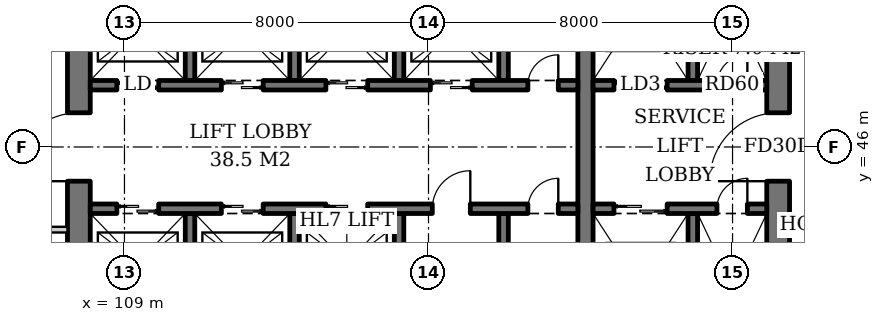
"""IFC4 building model, lengths in metres.
Left out: names, types, materials, properties, quantities, classifications, styles, units other than length and angle.
Written with IfcOpenShell. Run it as: python <this file> out.ifc"""

import sys

from ifc_helpers import new_model, si_unit, direction, frame, frame_2d, origin, place, context, subcontext, project, spatial, rectangle, extrude, element, fill, save


model = new_model("IFC4")
c1 = context("Model", 3, precision=1e-05, world=origin(), true_north=direction((0.0, 1.0)))
c2 = subcontext(c1, "Body", "Model", "MODEL_VIEW")
j1 = project(units=[si_unit("LENGTHUNIT", "METRE"), si_unit("PLANEANGLEUNIT", "RADIAN")], contexts=[c1])
p1 = place(None, origin())
s1 = spatial("IfcSite", under=j1, at=p1, CompositionType="ELEMENT")
p2 = place(p1, origin())
s2 = spatial("IfcBuilding", under=s1, at=p2, CompositionType="ELEMENT")
p3 = place(p2, origin())
s3 = spatial("IfcBuildingStorey", under=s2, at=p3, CompositionType="ELEMENT", Elevation=0.0)
p4 = place(p3, frame((107.8, 37.1, 0.0), z_axis=(0.0, 0.0, 1.0), x_axis=(0.0, 1.0, 0.0)))
e1 = element("IfcWall", 1, at=p4, inside=s3, PredefinedType="SHEAR", context=c2, shape_type="SweptSolid", body=[
    extrude(rectangle(XDim=17.8, YDim=0.6, at=frame_2d((8.9, 0.0))), origin(), (0.0, 0.0, 1.0), 6.0),
])
p5 = place(p4, frame((8.0, 0.0, 0.0)))
e2 = element("IfcOpeningElement", 2, at=p5, cuts=e1, PredefinedType="OPENING", context=c2, shape_type="SweptSolid", body=[
    extrude(rectangle(XDim=1.8, YDim=2.4, at=frame_2d((0.9, 1.2))), frame((0.0, 0.31, 0.0), z_axis=(0.0, -1.0, 0.0), x_axis=(1.0, 0.0, 0.0)), (0.0, 0.0, 1.0), 0.62),
])
p6 = place(p3, frame((126.2, 37.1, 0.0), z_axis=(0.0, 0.0, 1.0), x_axis=(0.0, 1.0, 0.0)))
e3 = element("IfcWall", 3, at=p6, inside=s3, PredefinedType="SHEAR", context=c2, shape_type="SweptSolid", body=[
    extrude(rectangle(XDim=17.8, YDim=0.6, at=frame_2d((8.9, 0.0))), origin(), (0.0, 0.0, 1.0), 6.0),
])
p7 = place(p6, frame((8.0, 0.0, 0.0)))
e4 = element("IfcOpeningElement", 4, at=p7, cuts=e3, PredefinedType="OPENING", context=c2, shape_type="SweptSolid", body=[
    extrude(rectangle(XDim=1.8, YDim=2.4, at=frame_2d((0.9, 1.2))), frame((0.0, 0.31, 0.0), z_axis=(0.0, -1.0, 0.0), x_axis=(1.0, 0.0, 0.0)), (0.0, 0.0, 1.0), 0.62),
])
p8 = place(p3, frame((121.13, 40.4, 0.0), z_axis=(0.0, 0.0, 1.0), x_axis=(0.0, 1.0, 0.0)))
e5 = element("IfcWall", 5, at=p8, inside=s3, PredefinedType="SHEAR", context=c2, shape_type="SweptSolid", body=[
    extrude(rectangle(XDim=11.2, YDim=0.4, at=frame_2d((5.6, 0.0))), origin(), (0.0, 0.0, 1.0), 6.0),
])
for number, where, z_axis, x_axis in (
    (6, (110.725, 47.75, 0.0), (0.0, 0.0, 1.0), (0.0, 1.0, 0.0)),
    (7, (113.475, 47.75, 0.0), (0.0, 0.0, 1.0), (0.0, 1.0, 0.0)),
    (8, (116.225, 47.75, 0.0), (0.0, 0.0, 1.0), (0.0, 1.0, 0.0)),
    (9, (118.975, 47.75, 0.0), (0.0, 0.0, 1.0), (0.0, 1.0, 0.0)),
):
    element("IfcWall", number, at=place(p3, frame(where, z_axis=z_axis, x_axis=x_axis)), inside=s3, PredefinedType="SHEAR", context=c2, shape_type="SweptSolid", body=[
        extrude(rectangle(XDim=2.6, YDim=0.25, at=frame_2d((1.3, 0.0))), origin(), (0.0, 0.0, 1.0), 6.0),
    ])
p9 = place(p3, frame((108.1, 47.625, 0.0), z_axis=(0.0, 0.0, 1.0), x_axis=(1.0, 0.0, 0.0)))
e10 = element("IfcWall", 10, at=p9, inside=s3, PredefinedType="SHEAR", context=c2, shape_type="SweptSolid", body=[
    extrude(rectangle(XDim=12.83, YDim=0.25, at=frame_2d((6.415, 0.0))), origin(), (0.0, 0.0, 1.0), 6.0),
])
p10 = place(p9, frame((0.7, 0.0, 0.0)))
e11 = element("IfcOpeningElement", 11, at=p10, cuts=e10, PredefinedType="OPENING", context=c2, shape_type="SweptSolid", body=[
    extrude(rectangle(XDim=1.1, YDim=2.2, at=frame_2d((0.55, 1.1))), frame((0.0, 0.135, 0.0), z_axis=(0.0, -1.0, 0.0), x_axis=(1.0, 0.0, 0.0)), (0.0, 0.0, 1.0), 0.27),
])
p11 = place(p9, frame((3.45, 0.0, 0.0)))
e12 = element("IfcOpeningElement", 12, at=p11, cuts=e10, PredefinedType="OPENING", context=c2, shape_type="SweptSolid", body=[
    extrude(rectangle(XDim=1.1, YDim=2.2, at=frame_2d((0.55, 1.1))), frame((0.0, 0.135, 0.0), z_axis=(0.0, -1.0, 0.0), x_axis=(1.0, 0.0, 0.0)), (0.0, 0.0, 1.0), 0.27),
])
p12 = place(p9, frame((6.2, 0.0, 0.0)))
e13 = element("IfcOpeningElement", 13, at=p12, cuts=e10, PredefinedType="OPENING", context=c2, shape_type="SweptSolid", body=[
    extrude(rectangle(XDim=1.1, YDim=2.2, at=frame_2d((0.55, 1.1))), frame((0.0, 0.135, 0.0), z_axis=(0.0, -1.0, 0.0), x_axis=(1.0, 0.0, 0.0)), (0.0, 0.0, 1.0), 0.27),
])
p13 = place(p9, frame((8.95, 0.0, 0.0)))
e14 = element("IfcOpeningElement", 14, at=p13, cuts=e10, PredefinedType="OPENING", context=c2, shape_type="SweptSolid", body=[
    extrude(rectangle(XDim=1.1, YDim=2.2, at=frame_2d((0.55, 1.1))), frame((0.0, 0.135, 0.0), z_axis=(0.0, -1.0, 0.0), x_axis=(1.0, 0.0, 0.0)), (0.0, 0.0, 1.0), 0.27),
])
p14 = place(p9, frame((11.515, 0.0, 0.0)))
e15 = element("IfcOpeningElement", 15, at=p14, cuts=e10, PredefinedType="OPENING", context=c2, shape_type="SweptSolid", body=[
    extrude(rectangle(XDim=0.8, YDim=2.0, at=frame_2d((0.4, 1.0))), frame((0.0, 0.135, 0.0), z_axis=(0.0, -1.0, 0.0), x_axis=(1.0, 0.0, 0.0)), (0.0, 0.0, 1.0), 0.27),
])
for number, where, z_axis, x_axis in (
    (16, (110.725, 44.25, 0.0), (0.0, 0.0, 1.0), (0.0, -1.0, 0.0)),
    (17, (113.475, 44.25, 0.0), (0.0, 0.0, 1.0), (0.0, -1.0, 0.0)),
    (18, (116.225, 44.25, 0.0), (0.0, 0.0, 1.0), (0.0, -1.0, 0.0)),
    (19, (118.975, 44.25, 0.0), (0.0, 0.0, 1.0), (0.0, -1.0, 0.0)),
):
    element("IfcWall", number, at=place(p3, frame(where, z_axis=z_axis, x_axis=x_axis)), inside=s3, PredefinedType="SHEAR", context=c2, shape_type="SweptSolid", body=[
        extrude(rectangle(XDim=2.6, YDim=0.25, at=frame_2d((1.3, 0.0))), origin(), (0.0, 0.0, 1.0), 6.0),
    ])
p15 = place(p3, frame((108.1, 44.375, 0.0), z_axis=(0.0, 0.0, 1.0), x_axis=(1.0, 0.0, 0.0)))
e20 = element("IfcWall", 20, at=p15, inside=s3, PredefinedType="SHEAR", context=c2, shape_type="SweptSolid", body=[
    extrude(rectangle(XDim=12.83, YDim=0.25, at=frame_2d((6.415, 0.0))), origin(), (0.0, 0.0, 1.0), 6.0),
])
p16 = place(p15, frame((0.7, 0.0, 0.0)))
e21 = element("IfcOpeningElement", 21, at=p16, cuts=e20, PredefinedType="OPENING", context=c2, shape_type="SweptSolid", body=[
    extrude(rectangle(XDim=1.1, YDim=2.2, at=frame_2d((0.55, 1.1))), frame((0.0, 0.135, 0.0), z_axis=(0.0, -1.0, 0.0), x_axis=(1.0, 0.0, 0.0)), (0.0, 0.0, 1.0), 0.27),
])
p17 = place(p15, frame((3.45, 0.0, 0.0)))
e22 = element("IfcOpeningElement", 22, at=p17, cuts=e20, PredefinedType="OPENING", context=c2, shape_type="SweptSolid", body=[
    extrude(rectangle(XDim=1.1, YDim=2.2, at=frame_2d((0.55, 1.1))), frame((0.0, 0.135, 0.0), z_axis=(0.0, -1.0, 0.0), x_axis=(1.0, 0.0, 0.0)), (0.0, 0.0, 1.0), 0.27),
])
p18 = place(p15, frame((6.2, 0.0, 0.0)))
e23 = element("IfcOpeningElement", 23, at=p18, cuts=e20, PredefinedType="OPENING", context=c2, shape_type="SweptSolid", body=[
    extrude(rectangle(XDim=1.1, YDim=2.2, at=frame_2d((0.55, 1.1))), frame((0.0, 0.135, 0.0), z_axis=(0.0, -1.0, 0.0), x_axis=(1.0, 0.0, 0.0)), (0.0, 0.0, 1.0), 0.27),
])
p19 = place(p15, frame((9.0, 0.0, 0.0)))
e24 = element("IfcOpeningElement", 24, at=p19, cuts=e20, PredefinedType="OPENING", context=c2, shape_type="SweptSolid", body=[
    extrude(rectangle(XDim=1.0, YDim=2.1, at=frame_2d((0.5, 1.05))), frame((0.0, 0.135, 0.0), z_axis=(0.0, -1.0, 0.0), x_axis=(1.0, 0.0, 0.0)), (0.0, 0.0, 1.0), 0.27),
])
p20 = place(p15, frame((11.515, 0.0, 0.0)))
e25 = element("IfcOpeningElement", 25, at=p20, cuts=e20, PredefinedType="OPENING", context=c2, shape_type="SweptSolid", body=[
    extrude(rectangle(XDim=0.8, YDim=2.0, at=frame_2d((0.4, 1.0))), frame((0.0, 0.135, 0.0), z_axis=(0.0, -1.0, 0.0), x_axis=(1.0, 0.0, 0.0)), (0.0, 0.0, 1.0), 0.27),
])
p21 = place(p3, frame((123.955, 47.75, 0.0), z_axis=(0.0, 0.0, 1.0), x_axis=(0.0, 1.0, 0.0)))
e26 = element("IfcWall", 26, at=p21, inside=s3, PredefinedType="SHEAR", context=c2, shape_type="SweptSolid", body=[
    extrude(rectangle(XDim=3.85, YDim=0.25, at=frame_2d((1.925, 0.0))), origin(), (0.0, 0.0, 1.0), 6.0),
])
p22 = place(p3, frame((121.33, 47.625, 0.0), z_axis=(0.0, 0.0, 1.0), x_axis=(1.0, 0.0, 0.0)))
e27 = element("IfcWall", 27, at=p22, inside=s3, PredefinedType="SHEAR", context=c2, shape_type="SweptSolid", body=[
    extrude(rectangle(XDim=4.57, YDim=0.25, at=frame_2d((2.285, 0.0))), origin(), (0.0, 0.0, 1.0), 6.0),
])
p23 = place(p22, frame((0.55, 0.0, 0.0)))
e28 = element("IfcOpeningElement", 28, at=p23, cuts=e27, PredefinedType="OPENING", context=c2, shape_type="SweptSolid", body=[
    extrude(rectangle(XDim=1.4, YDim=2.4, at=frame_2d((0.7, 1.2))), frame((0.0, 0.135, 0.0), z_axis=(0.0, -1.0, 0.0), x_axis=(1.0, 0.0, 0.0)), (0.0, 0.0, 1.0), 0.27),
])
p24 = place(p22, frame((3.26, 0.0, 0.0)))
e29 = element("IfcOpeningElement", 29, at=p24, cuts=e27, PredefinedType="OPENING", context=c2, shape_type="SweptSolid", body=[
    extrude(rectangle(XDim=0.8, YDim=2.0, at=frame_2d((0.4, 1.0))), frame((0.0, 0.135, 0.0), z_axis=(0.0, -1.0, 0.0), x_axis=(1.0, 0.0, 0.0)), (0.0, 0.0, 1.0), 0.27),
])
p25 = place(p3, frame((123.955, 44.25, 0.0), z_axis=(0.0, 0.0, 1.0), x_axis=(0.0, -1.0, 0.0)))
e30 = element("IfcWall", 30, at=p25, inside=s3, PredefinedType="SHEAR", context=c2, shape_type="SweptSolid", body=[
    extrude(rectangle(XDim=3.85, YDim=0.25, at=frame_2d((1.925, 0.0))), origin(), (0.0, 0.0, 1.0), 6.0),
])
p26 = place(p3, frame((121.33, 44.375, 0.0), z_axis=(0.0, 0.0, 1.0), x_axis=(1.0, 0.0, 0.0)))
e31 = element("IfcWall", 31, at=p26, inside=s3, PredefinedType="SHEAR", context=c2, shape_type="SweptSolid", body=[
    extrude(rectangle(XDim=4.57, YDim=0.25, at=frame_2d((2.285, 0.0))), origin(), (0.0, 0.0, 1.0), 6.0),
])
p27 = place(p26, frame((0.55, 0.0, 0.0)))
e32 = element("IfcOpeningElement", 32, at=p27, cuts=e31, PredefinedType="OPENING", context=c2, shape_type="SweptSolid", body=[
    extrude(rectangle(XDim=1.4, YDim=2.4, at=frame_2d((0.7, 1.2))), frame((0.0, 0.135, 0.0), z_axis=(0.0, -1.0, 0.0), x_axis=(1.0, 0.0, 0.0)), (0.0, 0.0, 1.0), 0.27),
])
p28 = place(p26, frame((3.26, 0.0, 0.0)))
e33 = element("IfcOpeningElement", 33, at=p28, cuts=e31, PredefinedType="OPENING", context=c2, shape_type="SweptSolid", body=[
    extrude(rectangle(XDim=0.8, YDim=2.0, at=frame_2d((0.4, 1.0))), frame((0.0, 0.135, 0.0), z_axis=(0.0, -1.0, 0.0), x_axis=(1.0, 0.0, 0.0)), (0.0, 0.0, 1.0), 0.27),
])
p29 = place(p3, frame((104.975, 43.825, 0.0), z_axis=(0.0, 0.0, 1.0), x_axis=(1.0, 0.0, 0.0)))
e34 = element("IfcWall", 34, at=p29, inside=s3, PredefinedType="PARTITIONING", context=c2, shape_type="SweptSolid", body=[
    extrude(rectangle(XDim=2.525, YDim=0.15, at=frame_2d((1.262, 0.0))), origin(), (0.0, 0.0, 1.0), 5.7),
])
p30 = place(p10, origin())
e35 = element("IfcDoor", 35, at=p30, inside=s3, OperationType="DOUBLE_DOOR_SLIDING", PredefinedType="DOOR", context=c2, shape_type="SweptSolid", body=[
    extrude(rectangle(XDim=1.1, YDim=2.2, at=frame_2d((0.55, 1.1))), frame((0.0, 0.025, 0.0), z_axis=(0.0, -1.0, 0.0), x_axis=(1.0, 0.0, 0.0)), (0.0, 0.0, 1.0), 0.05),
])
fill(e11, e35)
p31 = place(p11, origin())
e36 = element("IfcDoor", 36, at=p31, inside=s3, OperationType="DOUBLE_DOOR_SLIDING", PredefinedType="DOOR", context=c2, shape_type="SweptSolid", body=[
    extrude(rectangle(XDim=1.1, YDim=2.2, at=frame_2d((0.55, 1.1))), frame((0.0, 0.025, 0.0), z_axis=(0.0, -1.0, 0.0), x_axis=(1.0, 0.0, 0.0)), (0.0, 0.0, 1.0), 0.05),
])
fill(e12, e36)
p32 = place(p12, origin())
e37 = element("IfcDoor", 37, at=p32, inside=s3, OperationType="DOUBLE_DOOR_SLIDING", PredefinedType="DOOR", context=c2, shape_type="SweptSolid", body=[
    extrude(rectangle(XDim=1.1, YDim=2.2, at=frame_2d((0.55, 1.1))), frame((0.0, 0.025, 0.0), z_axis=(0.0, -1.0, 0.0), x_axis=(1.0, 0.0, 0.0)), (0.0, 0.0, 1.0), 0.05),
])
fill(e13, e37)
p33 = place(p13, origin())
e38 = element("IfcDoor", 38, at=p33, inside=s3, OperationType="DOUBLE_DOOR_SLIDING", PredefinedType="DOOR", context=c2, shape_type="SweptSolid", body=[
    extrude(rectangle(XDim=1.1, YDim=2.2, at=frame_2d((0.55, 1.1))), frame((0.0, 0.025, 0.0), z_axis=(0.0, -1.0, 0.0), x_axis=(1.0, 0.0, 0.0)), (0.0, 0.0, 1.0), 0.05),
])
fill(e14, e38)
p34 = place(p14, origin())
e39 = element("IfcDoor", 39, at=p34, inside=s3, OperationType="SINGLE_SWING_RIGHT", PredefinedType="DOOR", context=c2, shape_type="SweptSolid", body=[
    extrude(rectangle(XDim=0.8, YDim=2.0, at=frame_2d((0.4, 1.0))), frame((0.0, 0.025, 0.0), z_axis=(0.0, -1.0, 0.0), x_axis=(1.0, 0.0, 0.0)), (0.0, 0.0, 1.0), 0.05),
])
fill(e15, e39)
p35 = place(p16, origin())
e40 = element("IfcDoor", 40, at=p35, inside=s3, OperationType="DOUBLE_DOOR_SLIDING", PredefinedType="DOOR", context=c2, shape_type="SweptSolid", body=[
    extrude(rectangle(XDim=1.1, YDim=2.2, at=frame_2d((0.55, 1.1))), frame((0.0, 0.025, 0.0), z_axis=(0.0, -1.0, 0.0), x_axis=(1.0, 0.0, 0.0)), (0.0, 0.0, 1.0), 0.05),
])
fill(e21, e40)
p36 = place(p17, origin())
e41 = element("IfcDoor", 41, at=p36, inside=s3, OperationType="DOUBLE_DOOR_SLIDING", PredefinedType="DOOR", context=c2, shape_type="SweptSolid", body=[
    extrude(rectangle(XDim=1.1, YDim=2.2, at=frame_2d((0.55, 1.1))), frame((0.0, 0.025, 0.0), z_axis=(0.0, -1.0, 0.0), x_axis=(1.0, 0.0, 0.0)), (0.0, 0.0, 1.0), 0.05),
])
fill(e22, e41)
p37 = place(p18, origin())
e42 = element("IfcDoor", 42, at=p37, inside=s3, OperationType="DOUBLE_DOOR_SLIDING", PredefinedType="DOOR", context=c2, shape_type="SweptSolid", body=[
    extrude(rectangle(XDim=1.1, YDim=2.2, at=frame_2d((0.55, 1.1))), frame((0.0, 0.025, 0.0), z_axis=(0.0, -1.0, 0.0), x_axis=(1.0, 0.0, 0.0)), (0.0, 0.0, 1.0), 0.05),
])
fill(e23, e42)
p38 = place(p19, origin())
e43 = element("IfcDoor", 43, at=p38, inside=s3, OperationType="SINGLE_SWING_RIGHT", PredefinedType="DOOR", context=c2, shape_type="SweptSolid", body=[
    extrude(rectangle(XDim=1.0, YDim=2.1, at=frame_2d((0.5, 1.05))), frame((0.0, 0.025, 0.0), z_axis=(0.0, -1.0, 0.0), x_axis=(1.0, 0.0, 0.0)), (0.0, 0.0, 1.0), 0.05),
])
fill(e24, e43)
p39 = place(p20, origin())
e44 = element("IfcDoor", 44, at=p39, inside=s3, OperationType="SINGLE_SWING_RIGHT", PredefinedType="DOOR", context=c2, shape_type="SweptSolid", body=[
    extrude(rectangle(XDim=0.8, YDim=2.0, at=frame_2d((0.4, 1.0))), frame((0.0, 0.025, 0.0), z_axis=(0.0, -1.0, 0.0), x_axis=(1.0, 0.0, 0.0)), (0.0, 0.0, 1.0), 0.05),
])
fill(e25, e44)
p40 = place(p23, origin())
e45 = element("IfcDoor", 45, at=p40, inside=s3, OperationType="DOUBLE_DOOR_SLIDING", PredefinedType="DOOR", context=c2, shape_type="SweptSolid", body=[
    extrude(rectangle(XDim=1.4, YDim=2.4, at=frame_2d((0.7, 1.2))), frame((0.0, 0.025, 0.0), z_axis=(0.0, -1.0, 0.0), x_axis=(1.0, 0.0, 0.0)), (0.0, 0.0, 1.0), 0.05),
])
fill(e28, e45)
p41 = place(p24, origin())
e46 = element("IfcDoor", 46, at=p41, inside=s3, OperationType="SINGLE_SWING_RIGHT", PredefinedType="DOOR", context=c2, shape_type="SweptSolid", body=[
    extrude(rectangle(XDim=0.8, YDim=2.0, at=frame_2d((0.4, 1.0))), frame((0.0, 0.025, 0.0), z_axis=(0.0, -1.0, 0.0), x_axis=(1.0, 0.0, 0.0)), (0.0, 0.0, 1.0), 0.05),
])
fill(e29, e46)
p42 = place(p27, origin())
e47 = element("IfcDoor", 47, at=p42, inside=s3, OperationType="DOUBLE_DOOR_SLIDING", PredefinedType="DOOR", context=c2, shape_type="SweptSolid", body=[
    extrude(rectangle(XDim=1.4, YDim=2.4, at=frame_2d((0.7, 1.2))), frame((0.0, 0.025, 0.0), z_axis=(0.0, -1.0, 0.0), x_axis=(1.0, 0.0, 0.0)), (0.0, 0.0, 1.0), 0.05),
])
fill(e32, e47)
p43 = place(p28, origin())
e48 = element("IfcDoor", 48, at=p43, inside=s3, OperationType="SINGLE_SWING_RIGHT", PredefinedType="DOOR", context=c2, shape_type="SweptSolid", body=[
    extrude(rectangle(XDim=0.8, YDim=2.0, at=frame_2d((0.4, 1.0))), frame((0.0, 0.025, 0.0), z_axis=(0.0, -1.0, 0.0), x_axis=(1.0, 0.0, 0.0)), (0.0, 0.0, 1.0), 0.05),
])
fill(e33, e48)
p44 = place(p5, origin())
e49 = element("IfcDoor", 49, at=p44, inside=s3, OperationType="DOUBLE_DOOR_SINGLE_SWING", PredefinedType="DOOR", context=c2, shape_type="SweptSolid", body=[
    extrude(rectangle(XDim=1.8, YDim=2.4, at=frame_2d((0.9, 1.2))), frame((0.0, 0.025, 0.0), z_axis=(0.0, -1.0, 0.0), x_axis=(1.0, 0.0, 0.0)), (0.0, 0.0, 1.0), 0.05),
])
fill(e2, e49)
p45 = place(p7, origin())
e50 = element("IfcDoor", 50, at=p45, inside=s3, OperationType="DOUBLE_DOOR_SINGLE_SWING", PredefinedType="DOOR", context=c2, shape_type="SweptSolid", body=[
    extrude(rectangle(XDim=1.8, YDim=2.4, at=frame_2d((0.9, 1.2))), frame((0.0, 0.025, 0.0), z_axis=(0.0, -1.0, 0.0), x_axis=(1.0, 0.0, 0.0)), (0.0, 0.0, 1.0), 0.05),
])
fill(e4, e50)
save(model, sys.argv[1])
